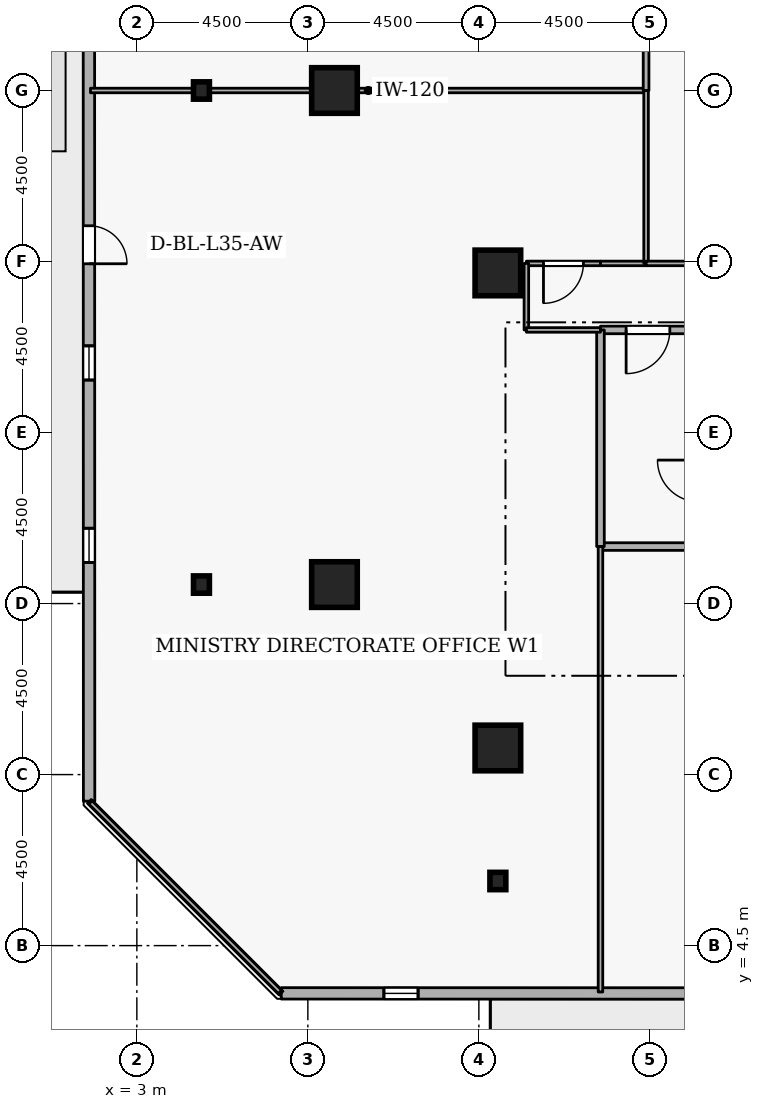
"""IFC4 building model, lengths in metres.
Left out: names, types, materials, properties, quantities, classifications, styles, units other than length and angle.
Written with IfcOpenShell. Run it as: python <this file> out.ifc"""

import sys

from ifc_helpers import new_model, si_unit, direction, frame, frame_2d, origin, origin_2d, place, context, subcontext, project, spatial, rectangle, i_section, extrude, element, fill, save


model = new_model("IFC4")
c1 = context("Model", 3, precision=1e-05, world=origin(), true_north=direction((0.0, 1.0)))
c2 = subcontext(c1, "Body", "Model", "MODEL_VIEW")
j1 = project(units=[si_unit("LENGTHUNIT", "METRE"), si_unit("PLANEANGLEUNIT", "RADIAN")], contexts=[c1])
p1 = place(None, origin())
s1 = spatial("IfcSite", under=j1, at=p1, CompositionType="ELEMENT")
p2 = place(p1, origin())
s2 = spatial("IfcBuilding", under=s1, at=p2, CompositionType="ELEMENT")
p3 = place(p2, frame((0.0, 0.0, 134.1)))
s3 = spatial("IfcBuildingStorey", under=s2, at=p3, CompositionType="ELEMENT", Elevation=134.1)
for number, where, z_axis, x_axis in (
    (1, (12.5, 9.7, 0.0), (0.0, 0.0, 1.0), (1.0, 0.0, 0.0)),
    (2, (8.2, 14.0, 0.0), (0.0, 0.0, 1.0), (1.0, 0.0, 0.0)),
    (3, (8.2, 27.0, 0.0), (0.0, 0.0, 1.0), (1.0, 0.0, 0.0)),
    (4, (12.5, 22.2, 0.0), (0.0, 0.0, 1.0), (1.0, 0.0, 0.0)),
):
    element("IfcColumn", number, at=place(p3, frame(where, z_axis=z_axis, x_axis=x_axis)), inside=s3, PredefinedType="COLUMN", context=c2, shape_type="SweptSolid", body=[
        extrude(rectangle(XDim=1.2, YDim=1.2, at=origin_2d()), origin(), (0.0, 0.0, 1.0), 3.6),
    ])
for number, where, z_axis, x_axis in (
    (5, (12.5, 6.2, 0.0), (0.0, 0.0, 1.0), (1.0, 0.0, 0.0)),
    (6, (4.7, 14.0, 0.0), (0.0, 0.0, 1.0), (1.0, 0.0, 0.0)),
    (7, (4.7, 27.0, 0.0), (0.0, 0.0, 1.0), (1.0, 0.0, 0.0)),
):
    element("IfcColumn", number, at=place(p3, frame(where, z_axis=z_axis, x_axis=x_axis)), inside=s3, PredefinedType="COLUMN", context=c2, shape_type="SweptSolid", body=[
        extrude(i_section(OverallWidth=0.418, OverallDepth=0.456, WebThickness=0.042, FlangeThickness=0.067, FilletRadius=0.015, at=origin_2d()), origin(), (0.0, 0.0, 1.0), 3.6),
    ])
p4 = place(p3, frame((6.801, 3.244, 0.0), z_axis=(0.0, 0.0, 1.0), x_axis=(0.999999969988, -0.000244999128, 0.0)))
e8 = element("IfcWall", 8, at=p4, inside=s3, PredefinedType="STANDARD", context=c2, shape_type="SweptSolid", body=[
    extrude(rectangle(XDim=33.881, YDim=0.3, at=frame_2d((16.94, 0.0))), origin(), (0.0, 0.0, 1.0), 2.7),
])
p5 = place(p4, frame((26.84, 0.0, 0.0)))
e9 = element("IfcOpeningElement", 9, at=p5, cuts=e8, PredefinedType="OPENING", context=c2, shape_type="SweptSolid", body=[
    extrude(rectangle(XDim=1.0, YDim=2.08, at=frame_2d((0.5, 1.04))), frame((0.0, 0.16, 0.0), z_axis=(0.0, -1.0, 0.0), x_axis=(1.0, 0.0, 0.0)), (0.0, 0.0, 1.0), 0.32),
])
p6 = place(p4, frame((2.7, 0.0, 0.72)))
e10 = element("IfcOpeningElement", 10, at=p6, cuts=e8, PredefinedType="OPENING", context=c2, shape_type="SweptSolid", body=[
    extrude(rectangle(XDim=0.9, YDim=1.75, at=frame_2d((0.45, 0.875))), frame((0.0, 0.16, 0.0), z_axis=(0.0, -1.0, 0.0), x_axis=(1.0, 0.0, 0.0)), (0.0, 0.0, 1.0), 0.32),
])
p7 = place(p4, frame((12.3, 0.0, 0.72)))
e11 = element("IfcOpeningElement", 11, at=p7, cuts=e8, PredefinedType="OPENING", context=c2, shape_type="SweptSolid", body=[
    extrude(rectangle(XDim=0.9, YDim=1.75, at=frame_2d((0.45, 0.875))), frame((0.0, 0.16, 0.0), z_axis=(0.0, -1.0, 0.0), x_axis=(1.0, 0.0, 0.0)), (0.0, 0.0, 1.0), 0.32),
])
p8 = place(p4, frame((17.1, 0.0, 0.72)))
e12 = element("IfcOpeningElement", 12, at=p8, cuts=e8, PredefinedType="OPENING", context=c2, shape_type="SweptSolid", body=[
    extrude(rectangle(XDim=0.9, YDim=1.75, at=frame_2d((0.45, 0.875))), frame((0.0, 0.16, 0.0), z_axis=(0.0, -1.0, 0.0), x_axis=(1.0, 0.0, 0.0)), (0.0, 0.0, 1.0), 0.32),
])
p9 = place(p4, frame((21.9, 0.0, 0.72)))
e13 = element("IfcOpeningElement", 13, at=p9, cuts=e8, PredefinedType="OPENING", context=c2, shape_type="SweptSolid", body=[
    extrude(rectangle(XDim=0.9, YDim=1.75, at=frame_2d((0.45, 0.875))), frame((0.0, 0.16, 0.0), z_axis=(0.0, -1.0, 0.0), x_axis=(1.0, 0.0, 0.0)), (0.0, 0.0, 1.0), 0.32),
])
p10 = place(p3, frame((1.735, 42.181, 0.0), z_axis=(0.0, 0.0, 1.0), x_axis=(0.000244999128, -0.999999969988, 0.0)))
e14 = element("IfcWall", 14, at=p10, inside=s3, PredefinedType="STANDARD", context=c2, shape_type="SweptSolid", body=[
    extrude(rectangle(XDim=33.881, YDim=0.3, at=frame_2d((16.94, 0.0))), origin(), (0.0, 0.0, 1.0), 2.7),
])
p11 = place(p10, frame((18.74, 0.0, 0.0)))
e15 = element("IfcOpeningElement", 15, at=p11, cuts=e14, PredefinedType="OPENING", context=c2, shape_type="SweptSolid", body=[
    extrude(rectangle(XDim=1.0, YDim=2.08, at=frame_2d((0.5, 1.04))), frame((0.0, 0.16, 0.0), z_axis=(0.0, -1.0, 0.0), x_axis=(1.0, 0.0, 0.0)), (0.0, 0.0, 1.0), 0.32),
])
p12 = place(p10, frame((2.7, 0.0, 0.72)))
e16 = element("IfcOpeningElement", 16, at=p12, cuts=e14, PredefinedType="OPENING", context=c2, shape_type="SweptSolid", body=[
    extrude(rectangle(XDim=0.9, YDim=1.75, at=frame_2d((0.45, 0.875))), frame((0.0, 0.16, 0.0), z_axis=(0.0, -1.0, 0.0), x_axis=(1.0, 0.0, 0.0)), (0.0, 0.0, 1.0), 0.32),
])
p13 = place(p10, frame((7.5, 0.0, 0.72)))
e17 = element("IfcOpeningElement", 17, at=p13, cuts=e14, PredefinedType="OPENING", context=c2, shape_type="SweptSolid", body=[
    extrude(rectangle(XDim=0.9, YDim=1.75, at=frame_2d((0.45, 0.875))), frame((0.0, 0.16, 0.0), z_axis=(0.0, -1.0, 0.0), x_axis=(1.0, 0.0, 0.0)), (0.0, 0.0, 1.0), 0.32),
])
p14 = place(p10, frame((12.3, 0.0, 0.72)))
e18 = element("IfcOpeningElement", 18, at=p14, cuts=e14, PredefinedType="OPENING", context=c2, shape_type="SweptSolid", body=[
    extrude(rectangle(XDim=0.9, YDim=1.75, at=frame_2d((0.45, 0.875))), frame((0.0, 0.16, 0.0), z_axis=(0.0, -1.0, 0.0), x_axis=(1.0, 0.0, 0.0)), (0.0, 0.0, 1.0), 0.32),
])
p15 = place(p10, frame((21.9, 0.0, 0.72)))
e19 = element("IfcOpeningElement", 19, at=p15, cuts=e14, PredefinedType="OPENING", context=c2, shape_type="SweptSolid", body=[
    extrude(rectangle(XDim=0.9, YDim=1.75, at=frame_2d((0.45, 0.875))), frame((0.0, 0.16, 0.0), z_axis=(0.0, -1.0, 0.0), x_axis=(1.0, 0.0, 0.0)), (0.0, 0.0, 1.0), 0.32),
])
p16 = place(p10, frame((26.7, 0.0, 0.72)))
e20 = element("IfcOpeningElement", 20, at=p16, cuts=e14, PredefinedType="OPENING", context=c2, shape_type="SweptSolid", body=[
    extrude(rectangle(XDim=0.9, YDim=1.75, at=frame_2d((0.45, 0.875))), frame((0.0, 0.16, 0.0), z_axis=(0.0, -1.0, 0.0), x_axis=(1.0, 0.0, 0.0)), (0.0, 0.0, 1.0), 0.32),
])
p17 = place(p3, frame((15.2, 15.0, 0.0), z_axis=(0.0, 0.0, 1.0), x_axis=(1.0, 0.0, 0.0)))
e21 = element("IfcWall", 21, at=p17, inside=s3, PredefinedType="STANDARD", context=c2, shape_type="SweptSolid", body=[
    extrude(rectangle(XDim=2.5, YDim=0.2, at=frame_2d((1.25, 0.0))), origin(), (0.0, 0.0, 1.0), 3.34),
])
p18 = place(p3, frame((17.7, 20.7, 0.0), z_axis=(0.0, 0.0, 1.0), x_axis=(-1.0, 0.0, 0.0)))
e22 = element("IfcWall", 22, at=p18, inside=s3, PredefinedType="STANDARD", context=c2, shape_type="SweptSolid", body=[
    extrude(rectangle(XDim=2.5, YDim=0.2, at=frame_2d((1.25, 0.0))), origin(), (0.0, 0.0, 1.0), 3.34),
])
p19 = place(p18, frame((0.675, 0.0, 0.0)))
e23 = element("IfcOpeningElement", 23, at=p19, cuts=e22, PredefinedType="OPENING", context=c2, shape_type="SweptSolid", body=[
    extrude(rectangle(XDim=1.15, YDim=2.1, at=frame_2d((0.575, 1.05))), frame((0.0, 0.11, 0.0), z_axis=(0.0, -1.0, 0.0), x_axis=(1.0, 0.0, 0.0)), (0.0, 0.0, 1.0), 0.22),
])
p20 = place(p3, frame((15.2, 20.7, 0.0), z_axis=(0.0, 0.0, 1.0), x_axis=(0.0, -1.0, 0.0)))
e24 = element("IfcWall", 24, at=p20, inside=s3, PredefinedType="STANDARD", context=c2, shape_type="SweptSolid", body=[
    extrude(rectangle(XDim=5.7, YDim=0.2, at=frame_2d((2.85, 0.0))), origin(), (0.0, 0.0, 1.0), 3.34),
])
p21 = place(p3, frame((16.4, 22.45, 0.0), z_axis=(0.0, 0.0, 1.0), x_axis=(-1.0, 0.0, 0.0)))
e25 = element("IfcWall", 25, at=p21, inside=s3, PredefinedType="PARTITIONING", context=c2, shape_type="SweptSolid", body=[
    extrude(rectangle(XDim=1.2, YDim=0.12, at=frame_2d((0.6, 0.0))), origin(), (0.0, 0.0, 1.0), 3.34),
])
p22 = place(p3, frame((15.2, 22.45, 0.0), z_axis=(0.0, 0.0, 1.0), x_axis=(-1.0, 0.0, 0.0)))
e26 = element("IfcWall", 26, at=p22, inside=s3, PredefinedType="PARTITIONING", context=c2, shape_type="SweptSolid", body=[
    extrude(rectangle(XDim=1.95, YDim=0.12, at=frame_2d((0.975, 0.0))), origin(), (0.0, 0.0, 1.0), 3.34),
])
p23 = place(p22, frame((0.45, 0.0, 0.0)))
e27 = element("IfcOpeningElement", 27, at=p23, cuts=e26, PredefinedType="OPENING", context=c2, shape_type="SweptSolid", body=[
    extrude(rectangle(XDim=1.05, YDim=2.1, at=frame_2d((0.525, 1.05))), frame((0.0, 0.07, 0.0), z_axis=(0.0, -1.0, 0.0), x_axis=(1.0, 0.0, 0.0)), (0.0, 0.0, 1.0), 0.14),
])
p24 = place(p3, frame((13.25, 22.45, 0.0), z_axis=(0.0, 0.0, 1.0), x_axis=(0.0, -1.0, 0.0)))
e28 = element("IfcWall", 28, at=p24, inside=s3, PredefinedType="PARTITIONING", context=c2, shape_type="SweptSolid", body=[
    extrude(rectangle(XDim=1.75, YDim=0.12, at=frame_2d((0.875, 0.0))), origin(), (0.0, 0.0, 1.0), 3.34),
])
p25 = place(p3, frame((13.25, 20.7, 0.0), z_axis=(0.0, 0.0, 1.0), x_axis=(1.0, 0.0, 0.0)))
e29 = element("IfcWall", 29, at=p25, inside=s3, PredefinedType="PARTITIONING", context=c2, shape_type="SweptSolid", body=[
    extrude(rectangle(XDim=1.95, YDim=0.12, at=frame_2d((0.975, 0.0))), origin(), (0.0, 0.0, 1.0), 3.34),
])
p26 = place(p3, frame((15.2, 15.0, 0.0), z_axis=(0.0, 0.0, 1.0), x_axis=(0.0, -1.0, 0.0)))
e30 = element("IfcWall", 30, at=p26, inside=s3, PredefinedType="PARTITIONING", context=c2, shape_type="SweptSolid", body=[
    extrude(rectangle(XDim=11.72, YDim=0.12, at=frame_2d((5.86, 0.0))), origin(), (0.0, 0.0, 1.0), 3.34),
])
p27 = place(p3, frame((6.767, 3.28, 0.0), z_axis=(0.0, 0.0, 1.0), x_axis=(-0.707106781187, 0.707106781187, 0.0)))
e31 = element("IfcWall", 31, at=p27, inside=s3, PredefinedType="PARTITIONING", context=c2, shape_type="SweptSolid", body=[
    extrude(rectangle(XDim=7.052, YDim=0.12, at=frame_2d((3.526, 0.0))), origin(), (0.0, 0.0, 1.0), 3.34),
])
p28 = place(p3, frame((1.78, 27.0, 0.0), z_axis=(0.0, 0.0, 1.0), x_axis=(1.0, 0.0, 0.0)))
e32 = element("IfcWall", 32, at=p28, inside=s3, PredefinedType="PARTITIONING", context=c2, shape_type="SweptSolid", body=[
    extrude(rectangle(XDim=14.62, YDim=0.12, at=frame_2d((7.31, 0.0))), origin(), (0.0, 0.0, 1.0), 2.878),
])
p29 = place(p3, frame((16.4, 27.0, 0.0), z_axis=(0.0, 0.0, 1.0), x_axis=(0.0, -1.0, 0.0)))
e33 = element("IfcWall", 33, at=p29, inside=s3, PredefinedType="PARTITIONING", context=c2, shape_type="SweptSolid", body=[
    extrude(rectangle(XDim=4.55, YDim=0.12, at=frame_2d((2.275, 0.0))), origin(), (0.0, 0.0, 1.0), 3.34),
])
p30 = place(p3, frame((16.4, 31.55, 0.0), z_axis=(0.0, 0.0, 1.0), x_axis=(0.0, -1.0, 0.0)))
e34 = element("IfcWall", 34, at=p30, inside=s3, PredefinedType="PARTITIONING", context=c2, shape_type="SweptSolid", body=[
    extrude(rectangle(XDim=4.55, YDim=0.15, at=frame_2d((2.275, 0.0))), origin(), (0.0, 0.0, 1.0), 3.34),
])
p31 = place(p3, frame((20.9, 22.45, 0.0), z_axis=(0.0, 0.0, 1.0), x_axis=(-1.0, 0.0, 0.0)))
e35 = element("IfcWall", 35, at=p31, inside=s3, PredefinedType="PARTITIONING", context=c2, shape_type="SweptSolid", body=[
    extrude(rectangle(XDim=4.5, YDim=0.12, at=frame_2d((2.25, 0.0))), origin(), (0.0, 0.0, 1.0), 3.34),
])
p32 = place(p6, origin())
e36 = element("IfcWindow", 36, at=p32, inside=s3, PartitioningType="SINGLE_PANEL", PredefinedType="WINDOW", context=c2, shape_type="SweptSolid", body=[
    extrude(rectangle(XDim=0.9, YDim=1.75, at=frame_2d((0.45, 0.875))), frame((0.0, 0.03, 0.0), z_axis=(0.0, -1.0, 0.0), x_axis=(1.0, 0.0, 0.0)), (0.0, 0.0, 1.0), 0.06),
])
fill(e10, e36)
p33 = place(p11, origin())
e37 = element("IfcDoor", 37, at=p33, inside=s3, OperationType="SINGLE_SWING_RIGHT", PredefinedType="DOOR", context=c2, shape_type="SweptSolid", body=[
    extrude(rectangle(XDim=1.0, YDim=2.08, at=frame_2d((0.5, 1.04))), frame((0.0, 0.025, 0.0), z_axis=(0.0, -1.0, 0.0), x_axis=(1.0, 0.0, 0.0)), (0.0, 0.0, 1.0), 0.05),
])
fill(e15, e37)
p34 = place(p15, origin())
e38 = element("IfcWindow", 38, at=p34, inside=s3, PartitioningType="SINGLE_PANEL", PredefinedType="WINDOW", context=c2, shape_type="SweptSolid", body=[
    extrude(rectangle(XDim=0.9, YDim=1.75, at=frame_2d((0.45, 0.875))), frame((0.0, 0.03, 0.0), z_axis=(0.0, -1.0, 0.0), x_axis=(1.0, 0.0, 0.0)), (0.0, 0.0, 1.0), 0.06),
])
fill(e19, e38)
p35 = place(p16, origin())
e39 = element("IfcWindow", 39, at=p35, inside=s3, PartitioningType="SINGLE_PANEL", PredefinedType="WINDOW", context=c2, shape_type="SweptSolid", body=[
    extrude(rectangle(XDim=0.9, YDim=1.75, at=frame_2d((0.45, 0.875))), frame((0.0, 0.03, 0.0), z_axis=(0.0, -1.0, 0.0), x_axis=(1.0, 0.0, 0.0)), (0.0, 0.0, 1.0), 0.06),
])
fill(e20, e39)
p36 = place(p19, origin())
e40 = element("IfcDoor", 40, at=p36, inside=s3, OperationType="SINGLE_SWING_RIGHT", PredefinedType="DOOR", context=c2, shape_type="SweptSolid", body=[
    extrude(rectangle(XDim=1.15, YDim=2.1, at=frame_2d((0.575, 1.05))), frame((0.0, 0.025, 0.0), z_axis=(0.0, -1.0, 0.0), x_axis=(1.0, 0.0, 0.0)), (0.0, 0.0, 1.0), 0.05),
])
fill(e23, e40)
p37 = place(p23, origin())
e41 = element("IfcDoor", 41, at=p37, inside=s3, OperationType="SINGLE_SWING_RIGHT", PredefinedType="DOOR", context=c2, shape_type="SweptSolid", body=[
    extrude(rectangle(XDim=1.05, YDim=2.1, at=frame_2d((0.525, 1.05))), frame((0.0, 0.025, 0.0), z_axis=(0.0, -1.0, 0.0), x_axis=(1.0, 0.0, 0.0)), (0.0, 0.0, 1.0), 0.05),
])
fill(e27, e41)
save(model, sys.argv[1])
